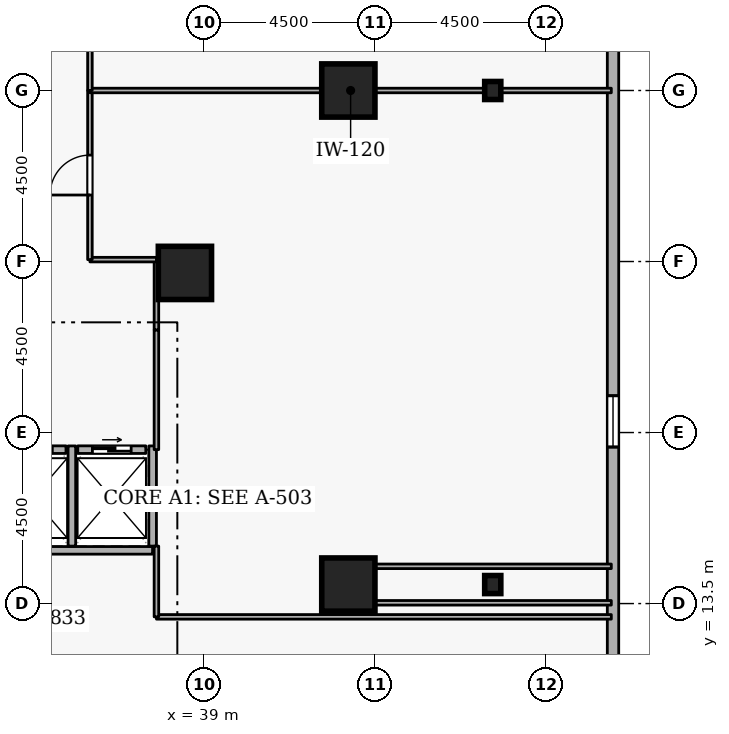
"""IFC4 building model, lengths in metres.
Left out: names, types, materials, properties, quantities, classifications, styles, units other than length and angle.
Written with IfcOpenShell. Run it as: python <this file> out.ifc"""

import sys

from ifc_helpers import new_model, si_unit, direction, frame, frame_2d, origin, origin_2d, place, context, subcontext, project, spatial, rectangle, i_section, extrude, element, fill, save


model = new_model("IFC4")
c1 = context("Model", 3, precision=1e-05, world=origin(), true_north=direction((0.0, 1.0)))
c2 = subcontext(c1, "Body", "Model", "MODEL_VIEW")
j1 = project(units=[si_unit("LENGTHUNIT", "METRE"), si_unit("PLANEANGLEUNIT", "RADIAN")], contexts=[c1])
p1 = place(None, origin())
s1 = spatial("IfcSite", under=j1, at=p1, CompositionType="ELEMENT")
p2 = place(p1, origin())
s2 = spatial("IfcBuilding", under=s1, at=p2, CompositionType="ELEMENT")
p3 = place(p2, frame((0.0, 0.0, 68.1)))
s3 = spatial("IfcBuildingStorey", under=s2, at=p3, CompositionType="ELEMENT", Elevation=68.1)
for number, where, z_axis, x_axis in (
    (1, (42.8, 14.0, 0.0), (0.0, 0.0, 1.0), (1.0, 0.0, 0.0)),
    (2, (42.8, 27.0, 0.0), (0.0, 0.0, 1.0), (1.0, 0.0, 0.0)),
    (3, (38.5, 22.2, 0.0), (0.0, 0.0, 1.0), (1.0, 0.0, 0.0)),
):
    element("IfcColumn", number, at=place(p3, frame(where, z_axis=z_axis, x_axis=x_axis)), inside=s3, PredefinedType="COLUMN", context=c2, shape_type="SweptSolid", body=[
        extrude(rectangle(XDim=1.4, YDim=1.4, at=origin_2d()), origin(), (0.0, 0.0, 1.0), 3.6),
    ])
for number, where, z_axis, x_axis in (
    (4, (46.6, 14.0, 0.0), (0.0, 0.0, 1.0), (1.0, 0.0, 0.0)),
    (5, (46.6, 27.0, 0.0), (0.0, 0.0, 1.0), (1.0, 0.0, 0.0)),
):
    element("IfcColumn", number, at=place(p3, frame(where, z_axis=z_axis, x_axis=x_axis)), inside=s3, PredefinedType="COLUMN", context=c2, shape_type="SweptSolid", body=[
        extrude(i_section(OverallWidth=0.424, OverallDepth=0.475, WebThickness=0.048, FlangeThickness=0.077, FilletRadius=0.015, at=origin_2d()), origin(), (0.0, 0.0, 1.0), 3.6),
    ])
p4 = place(p3, frame((49.765, 5.319, 0.0), z_axis=(0.0, 0.0, 1.0), x_axis=(0.0, 1.0, 0.0)))
e6 = element("IfcWall", 6, at=p4, inside=s3, PredefinedType="STANDARD", context=c2, shape_type="SweptSolid", body=[
    extrude(rectangle(XDim=37.362, YDim=0.3, at=frame_2d((18.681, 0.0))), origin(), (0.0, 0.0, 1.0), 2.66),
])
p5 = place(p4, frame((2.7, 0.0, 0.72)))
e7 = element("IfcOpeningElement", 7, at=p5, cuts=e6, PredefinedType="OPENING", context=c2, shape_type="SweptSolid", body=[
    extrude(rectangle(XDim=1.35, YDim=1.05, at=frame_2d((0.675, 0.525))), frame((0.0, 0.16, 0.0), z_axis=(0.0, -1.0, 0.0), x_axis=(1.0, 0.0, 0.0)), (0.0, 0.0, 1.0), 0.32),
])
p6 = place(p4, frame((12.3, 0.0, 0.72)))
e8 = element("IfcOpeningElement", 8, at=p6, cuts=e6, PredefinedType="OPENING", context=c2, shape_type="SweptSolid", body=[
    extrude(rectangle(XDim=1.35, YDim=1.05, at=frame_2d((0.675, 0.525))), frame((0.0, 0.16, 0.0), z_axis=(0.0, -1.0, 0.0), x_axis=(1.0, 0.0, 0.0)), (0.0, 0.0, 1.0), 0.32),
])
p7 = place(p4, frame((26.7, 0.0, 0.72)))
e9 = element("IfcOpeningElement", 9, at=p7, cuts=e6, PredefinedType="OPENING", context=c2, shape_type="SweptSolid", body=[
    extrude(rectangle(XDim=1.35, YDim=1.05, at=frame_2d((0.675, 0.525))), frame((0.0, 0.16, 0.0), z_axis=(0.0, -1.0, 0.0), x_axis=(1.0, 0.0, 0.0)), (0.0, 0.0, 1.0), 0.32),
])
p8 = place(p4, frame((31.5, 0.0, 0.72)))
e10 = element("IfcOpeningElement", 10, at=p8, cuts=e6, PredefinedType="OPENING", context=c2, shape_type="SweptSolid", body=[
    extrude(rectangle(XDim=1.35, YDim=1.05, at=frame_2d((0.675, 0.525))), frame((0.0, 0.16, 0.0), z_axis=(0.0, -1.0, 0.0), x_axis=(1.0, 0.0, 0.0)), (0.0, 0.0, 1.0), 0.32),
])
p9 = place(p3, frame((33.63, 17.55, 0.0), z_axis=(0.0, 0.0, 1.0), x_axis=(1.0, 0.0, 0.0)))
e11 = element("IfcWall", 11, at=p9, inside=s3, PredefinedType="STANDARD", context=c2, shape_type="SweptSolid", body=[
    extrude(rectangle(XDim=1.74, YDim=0.2, at=frame_2d((0.87, 0.0))), origin(), (0.0, 0.0, 1.0), 3.26),
])
p10 = place(p9, frame((0.36, 0.0, 0.0)))
e12 = element("IfcOpeningElement", 12, at=p10, cuts=e11, PredefinedType="OPENING", context=c2, shape_type="SweptSolid", body=[
    extrude(rectangle(XDim=1.02, YDim=2.06, at=frame_2d((0.51, 1.03))), frame((0.0, 0.11, 0.0), z_axis=(0.0, -1.0, 0.0), x_axis=(1.0, 0.0, 0.0)), (0.0, 0.0, 1.0), 0.22),
])
p11 = place(p3, frame((35.68, 17.55, 0.0), z_axis=(0.0, 0.0, 1.0), x_axis=(1.0, 0.0, 0.0)))
e13 = element("IfcWall", 13, at=p11, inside=s3, PredefinedType="STANDARD", context=c2, shape_type="SweptSolid", body=[
    extrude(rectangle(XDim=1.79, YDim=0.2, at=frame_2d((0.895, 0.0))), origin(), (0.0, 0.0, 1.0), 3.26),
])
p12 = place(p11, frame((0.385, 0.0, 0.0)))
e14 = element("IfcOpeningElement", 14, at=p12, cuts=e13, PredefinedType="OPENING", context=c2, shape_type="SweptSolid", body=[
    extrude(rectangle(XDim=1.02, YDim=2.06, at=frame_2d((0.51, 1.03))), frame((0.0, 0.11, 0.0), z_axis=(0.0, -1.0, 0.0), x_axis=(1.0, 0.0, 0.0)), (0.0, 0.0, 1.0), 0.22),
])
p13 = place(p3, frame((33.452, 14.9, 0.0), z_axis=(0.0, 0.0, 1.0), x_axis=(1.0, 0.0, 0.0)))
e15 = element("IfcWall", 15, at=p13, inside=s3, PredefinedType="STANDARD", context=c2, shape_type="SweptSolid", body=[
    extrude(rectangle(XDim=4.196, YDim=0.2, at=frame_2d((2.098, 0.0))), origin(), (0.0, 0.0, 1.0), 3.26),
])
for number, where, z_axis, x_axis in (
    (16, (35.525, 15.012, 0.0), (0.0, 0.0, 1.0), (0.0, 1.0, 0.0)),
    (17, (37.65, 15.012, 0.0), (0.0, 0.0, 1.0), (0.0, 1.0, 0.0)),
):
    element("IfcWall", number, at=place(p3, frame(where, z_axis=z_axis, x_axis=x_axis)), inside=s3, PredefinedType="STANDARD", context=c2, shape_type="SweptSolid", body=[
        extrude(rectangle(XDim=2.636, YDim=0.2, at=frame_2d((1.318, 0.0))), origin(), (0.0, 0.0, 1.0), 3.26),
    ])
p14 = place(p3, frame((37.75, 17.55, 0.0), z_axis=(0.0, 0.0, 1.0), x_axis=(0.0, 1.0, 0.0)))
e18 = element("IfcWall", 18, at=p14, inside=s3, PredefinedType="PARTITIONING", context=c2, shape_type="SweptSolid", body=[
    extrude(rectangle(XDim=3.15, YDim=0.12, at=frame_2d((1.575, 0.0))), origin(), (0.0, 0.0, 1.0), 3.26),
])
p15 = place(p3, frame((37.75, 20.7, 0.0), z_axis=(0.0, 0.0, 1.0), x_axis=(0.0, 1.0, 0.0)))
e19 = element("IfcWall", 19, at=p15, inside=s3, PredefinedType="PARTITIONING", context=c2, shape_type="SweptSolid", body=[
    extrude(rectangle(XDim=1.85, YDim=0.12, at=frame_2d((0.925, 0.0))), origin(), (0.0, 0.0, 1.0), 3.26),
])
p16 = place(p3, frame((37.75, 22.55, 0.0), z_axis=(0.0, 0.0, 1.0), x_axis=(-1.0, 0.0, 0.0)))
e20 = element("IfcWall", 20, at=p16, inside=s3, PredefinedType="PARTITIONING", context=c2, shape_type="SweptSolid", body=[
    extrude(rectangle(XDim=1.75, YDim=0.12, at=frame_2d((0.875, 0.0))), origin(), (0.0, 0.0, 1.0), 3.26),
])
p17 = place(p3, frame((36.0, 22.55, 0.0), z_axis=(0.0, 0.0, 1.0), x_axis=(0.0, 1.0, 0.0)))
e21 = element("IfcWall", 21, at=p17, inside=s3, PredefinedType="PARTITIONING", context=c2, shape_type="SweptSolid", body=[
    extrude(rectangle(XDim=4.45, YDim=0.12, at=frame_2d((2.225, 0.0))), origin(), (0.0, 0.0, 1.0), 3.26),
])
p18 = place(p17, frame((1.7, 0.0, 0.0)))
e22 = element("IfcOpeningElement", 22, at=p18, cuts=e21, PredefinedType="OPENING", context=c2, shape_type="SweptSolid", body=[
    extrude(rectangle(XDim=1.05, YDim=2.1, at=frame_2d((0.525, 1.05))), frame((0.0, 0.07, 0.0), z_axis=(0.0, -1.0, 0.0), x_axis=(1.0, 0.0, 0.0)), (0.0, 0.0, 1.0), 0.14),
])
p19 = place(p3, frame((36.0, 27.0, 0.0), z_axis=(0.0, 0.0, 1.0), x_axis=(1.0, 0.0, 0.0)))
e23 = element("IfcWall", 23, at=p19, inside=s3, PredefinedType="PARTITIONING", context=c2, shape_type="SweptSolid", body=[
    extrude(rectangle(XDim=13.72, YDim=0.12, at=frame_2d((6.86, 0.0))), origin(), (0.0, 0.0, 1.0), 2.798),
])
for number, where, z_axis, x_axis in (
    (24, (49.72, 14.48, 0.0), (0.0, 0.0, 1.0), (-1.0, 0.0, 0.0)),
    (25, (42.8, 13.52, 0.0), (0.0, 0.0, 1.0), (1.0, 0.0, 0.0)),
):
    element("IfcWall", number, at=place(p3, frame(where, z_axis=z_axis, x_axis=x_axis)), inside=s3, PredefinedType="PARTITIONING", context=c2, shape_type="SweptSolid", body=[
        extrude(rectangle(XDim=6.92, YDim=0.12, at=frame_2d((3.46, 0.0))), origin(), (0.0, 0.0, 1.0), 3.26),
    ])
p20 = place(p3, frame((49.72, 13.15, 0.0), z_axis=(0.0, 0.0, 1.0), x_axis=(-1.0, 0.0, 0.0)))
e26 = element("IfcWall", 26, at=p20, inside=s3, PredefinedType="PARTITIONING", context=c2, shape_type="SweptSolid", body=[
    extrude(rectangle(XDim=11.97, YDim=0.12, at=frame_2d((5.985, 0.0))), origin(), (0.0, 0.0, 1.0), 3.26),
])
p21 = place(p3, frame((37.75, 13.15, 0.0), z_axis=(0.0, 0.0, 1.0), x_axis=(0.0, 1.0, 0.0)))
e27 = element("IfcWall", 27, at=p21, inside=s3, PredefinedType="PARTITIONING", context=c2, shape_type="SweptSolid", body=[
    extrude(rectangle(XDim=1.862, YDim=0.12, at=frame_2d((0.931, 0.0))), origin(), (0.0, 0.0, 1.0), 3.26),
])
p22 = place(p3, frame((36.0, 27.0, 0.0), z_axis=(0.0, 0.0, 1.0), x_axis=(0.0, 1.0, 0.0)))
e28 = element("IfcWall", 28, at=p22, inside=s3, PredefinedType="PARTITIONING", context=c2, shape_type="SweptSolid", body=[
    extrude(rectangle(XDim=3.15, YDim=0.12, at=frame_2d((1.575, 0.0))), origin(), (0.0, 0.0, 1.0), 3.26),
])
p23 = place(p22, frame((1.1, 0.0, 0.0)))
e29 = element("IfcOpeningElement", 29, at=p23, cuts=e28, PredefinedType="OPENING", context=c2, shape_type="SweptSolid", body=[
    extrude(rectangle(XDim=0.95, YDim=2.1, at=frame_2d((0.475, 1.05))), frame((0.0, 0.07, 0.0), z_axis=(0.0, -1.0, 0.0), x_axis=(1.0, 0.0, 0.0)), (0.0, 0.0, 1.0), 0.14),
])
p24 = place(p6, origin())
e30 = element("IfcWindow", 30, at=p24, inside=s3, PartitioningType="SINGLE_PANEL", PredefinedType="WINDOW", context=c2, shape_type="SweptSolid", body=[
    extrude(rectangle(XDim=1.35, YDim=1.05, at=frame_2d((0.675, 0.525))), frame((0.0, 0.03, 0.0), z_axis=(0.0, -1.0, 0.0), x_axis=(1.0, 0.0, 0.0)), (0.0, 0.0, 1.0), 0.06),
])
fill(e8, e30)
p25 = place(p10, origin())
e31 = element("IfcDoor", 31, at=p25, inside=s3, OperationType="SLIDING_TO_LEFT", PredefinedType="DOOR", context=c2, shape_type="SweptSolid", body=[
    extrude(rectangle(XDim=1.02, YDim=2.06, at=frame_2d((0.51, 1.03))), frame((0.0, 0.025, 0.0), z_axis=(0.0, -1.0, 0.0), x_axis=(1.0, 0.0, 0.0)), (0.0, 0.0, 1.0), 0.05),
])
fill(e12, e31)
p26 = place(p12, origin())
e32 = element("IfcDoor", 32, at=p26, inside=s3, OperationType="SLIDING_TO_LEFT", PredefinedType="DOOR", context=c2, shape_type="SweptSolid", body=[
    extrude(rectangle(XDim=1.02, YDim=2.06, at=frame_2d((0.51, 1.03))), frame((0.0, 0.025, 0.0), z_axis=(0.0, -1.0, 0.0), x_axis=(1.0, 0.0, 0.0)), (0.0, 0.0, 1.0), 0.05),
])
fill(e14, e32)
p27 = place(p18, origin())
e33 = element("IfcDoor", 33, at=p27, inside=s3, OperationType="SINGLE_SWING_LEFT", PredefinedType="DOOR", context=c2, shape_type="SweptSolid", body=[
    extrude(rectangle(XDim=1.05, YDim=2.1, at=frame_2d((0.525, 1.05))), frame((0.0, 0.025, 0.0), z_axis=(0.0, -1.0, 0.0), x_axis=(1.0, 0.0, 0.0)), (0.0, 0.0, 1.0), 0.05),
])
fill(e22, e33)
save(model, sys.argv[1])
